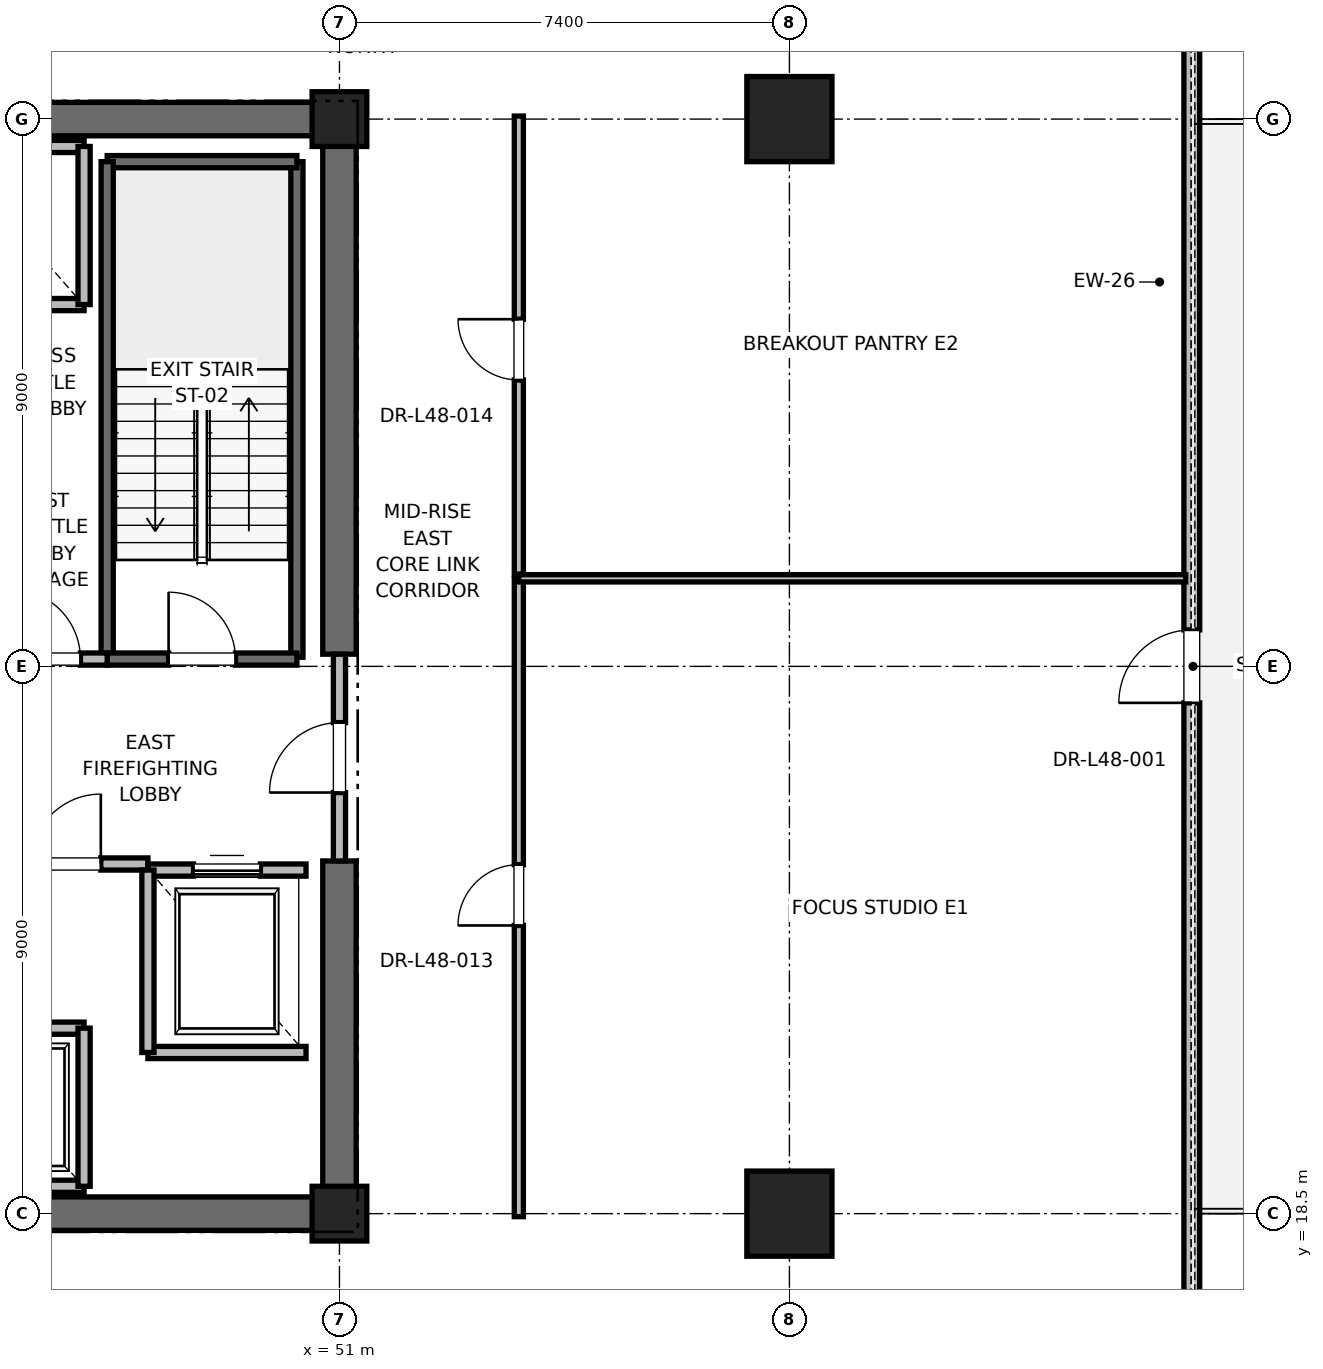
"""IFC4 building model, lengths in metres.
Left out: names, types, materials, properties, quantities, classifications, styles, units other than length and angle.
Written with IfcOpenShell. Run it as: python <this file> out.ifc"""

import sys

from ifc_helpers import new_model, si_unit, direction, frame, frame_2d, origin, origin_2d, place, context, subcontext, project, spatial, rectangle, extrude, element, fill, save


model = new_model("IFC4")
c1 = context("Model", 3, precision=1e-05, world=origin(), true_north=direction((0.0, 1.0)))
c2 = subcontext(c1, "Body", "Model", "MODEL_VIEW")
j1 = project(units=[si_unit("LENGTHUNIT", "METRE"), si_unit("PLANEANGLEUNIT", "RADIAN")], contexts=[c1])
p1 = place(None, origin())
s1 = spatial("IfcSite", under=j1, at=p1, CompositionType="ELEMENT")
p2 = place(p1, origin())
s2 = spatial("IfcBuilding", under=s1, at=p2, CompositionType="ELEMENT")
p3 = place(p2, frame((0.0, 0.0, 209.2)))
s3 = spatial("IfcBuildingStorey", under=s2, at=p3, CompositionType="ELEMENT", Elevation=209.2)
for number, where, z_axis, x_axis in (
    (1, (58.4, 18.5, 0.0), (0.0, 0.0, 1.0), (1.0, 0.0, 0.0)),
    (2, (58.4, 36.5, 0.0), (0.0, 0.0, 1.0), (1.0, 0.0, 0.0)),
):
    element("IfcColumn", number, at=place(p3, frame(where, z_axis=z_axis, x_axis=x_axis)), inside=s3, PredefinedType="COLUMN", context=c2, shape_type="SweptSolid", body=[
        extrude(rectangle(XDim=1.4, YDim=1.4, at=origin_2d()), origin(), (0.0, 0.0, 1.0), 4.0),
    ])
for number, where, z_axis, x_axis in (
    (3, (51.0, 18.5, 0.0), (0.0, 0.0, 1.0), (1.0, 0.0, 0.0)),
    (4, (51.0, 36.5, 0.0), (0.0, 0.0, 1.0), (1.0, 0.0, 0.0)),
):
    element("IfcColumn", number, at=place(p3, frame(where, z_axis=z_axis, x_axis=x_axis)), inside=s3, PredefinedType="PILASTER", context=c2, shape_type="SweptSolid", body=[
        extrude(rectangle(XDim=0.9, YDim=0.9, at=origin_2d()), origin(), (0.0, 0.0, 1.0), 4.0),
    ])
p4 = place(p3, frame((41.8, 18.5, 0.0), z_axis=(0.0, 0.0, 1.0), x_axis=(1.0, 0.0, 0.0)))
e5 = element("IfcWall", 5, at=p4, inside=s3, PredefinedType="SHEAR", context=c2, shape_type="SweptSolid", body=[
    extrude(rectangle(XDim=9.2, YDim=0.55, at=frame_2d((4.6, 0.0))), origin(), (0.0, 0.0, 1.0), 3.775),
])
for number, where, z_axis, x_axis in (
    (6, (45.2, 36.5, 0.0), (0.0, 0.0, 1.0), (1.0, 0.0, 0.0)),
    (7, (51.0, 18.5, 0.0), (0.0, 0.0, 1.0), (0.0, 1.0, 0.0)),
):
    element("IfcWall", number, at=place(p3, frame(where, z_axis=z_axis, x_axis=x_axis)), inside=s3, PredefinedType="SHEAR", context=c2, shape_type="SweptSolid", body=[
        extrude(rectangle(XDim=5.8, YDim=0.55, at=frame_2d((2.9, 0.0))), origin(), (0.0, 0.0, 1.0), 3.775),
    ])
p5 = place(p3, frame((51.0, 27.7, 0.0), z_axis=(0.0, 0.0, 1.0), x_axis=(0.0, 1.0, 0.0)))
e8 = element("IfcWall", 8, at=p5, inside=s3, PredefinedType="SHEAR", context=c2, shape_type="SweptSolid", body=[
    extrude(rectangle(XDim=8.8, YDim=0.55, at=frame_2d((4.4, 0.0))), origin(), (0.0, 0.0, 1.0), 3.775),
])
p6 = place(p3, frame((65.018, 9.258, 0.0), z_axis=(0.0, 0.0, 1.0), x_axis=(0.0, 1.0, 0.0)))
e9 = element("IfcWall", 9, at=p6, inside=s3, PredefinedType="PARAPET", context=c2, shape_type="SweptSolid", body=[
    extrude(rectangle(XDim=36.483, YDim=0.26, at=frame_2d((18.242, 0.0))), origin(), (0.0, 0.0, 1.0), 3.047),
])
p7 = place(p6, frame((4.2, 0.0, 0.85)))
e10 = element("IfcOpeningElement", 10, at=p7, cuts=e9, PredefinedType="OPENING", context=c2, shape_type="SweptSolid", body=[
    extrude(rectangle(XDim=2.0, YDim=2.3, at=frame_2d((1.0, 1.15))), frame((0.0, 0.13, 0.0), z_axis=(0.0, -1.0, 0.0), x_axis=(1.0, 0.0, 0.0)), (0.0, 0.0, 1.0), 0.26),
])
p8 = place(p6, frame((17.642, 0.0, 0.0)))
e11 = element("IfcOpeningElement", 11, at=p8, cuts=e9, PredefinedType="OPENING", context=c2, shape_type="SweptSolid", body=[
    extrude(rectangle(XDim=1.2, YDim=2.2, at=frame_2d((0.6, 1.1))), frame((0.0, 0.13, 0.0), z_axis=(0.0, -1.0, 0.0), x_axis=(1.0, 0.0, 0.0)), (0.0, 0.0, 1.0), 0.26),
])
p9 = place(p6, frame((30.283, 0.0, 0.85)))
e12 = element("IfcOpeningElement", 12, at=p9, cuts=e9, PredefinedType="OPENING", context=c2, shape_type="SweptSolid", body=[
    extrude(rectangle(XDim=2.0, YDim=2.3, at=frame_2d((1.0, 1.15))), frame((0.0, 0.13, 0.0), z_axis=(0.0, -1.0, 0.0), x_axis=(1.0, 0.0, 0.0)), (0.0, 0.0, 1.0), 0.26),
])
p10 = place(p3, frame((50.3, 27.65, 0.0), z_axis=(0.0, 0.0, 1.0), x_axis=(0.0, 1.0, 0.0)))
e13 = element("IfcWall", 13, at=p10, inside=s3, PredefinedType="SOLIDWALL", context=c2, shape_type="SweptSolid", body=[
    extrude(rectangle(XDim=8.15, YDim=0.2, at=frame_2d((4.075, 0.0))), origin(), (0.0, 0.0, 1.0), 3.775),
])
p11 = place(p3, frame((47.18, 35.8, 0.0), z_axis=(0.0, 0.0, 1.0), x_axis=(1.0, 0.0, 0.0)))
e14 = element("IfcWall", 14, at=p11, inside=s3, PredefinedType="SOLIDWALL", context=c2, shape_type="SweptSolid", body=[
    extrude(rectangle(XDim=3.12, YDim=0.2, at=frame_2d((1.56, 0.0))), origin(), (0.0, 0.0, 1.0), 3.775),
])
p12 = place(p3, frame((47.18, 27.62, 0.0), z_axis=(0.0, 0.0, 1.0), x_axis=(0.0, 1.0, 0.0)))
e15 = element("IfcWall", 15, at=p12, inside=s3, PredefinedType="SOLIDWALL", context=c2, shape_type="SweptSolid", body=[
    extrude(rectangle(XDim=8.18, YDim=0.2, at=frame_2d((4.09, 0.0))), origin(), (0.0, 0.0, 1.0), 3.775),
])
p13 = place(p3, frame((47.18, 27.62, 0.0), z_axis=(0.0, 0.0, 1.0), x_axis=(1.0, 0.0, 0.0)))
e16 = element("IfcWall", 16, at=p13, inside=s3, PredefinedType="SOLIDWALL", context=c2, shape_type="SweptSolid", body=[
    extrude(rectangle(XDim=3.12, YDim=0.2, at=frame_2d((1.56, 0.0))), origin(), (0.0, 0.0, 1.0), 3.775),
])
p14 = place(p13, frame((1.01, 0.0, 0.0)))
e17 = element("IfcOpeningElement", 17, at=p14, cuts=e16, PredefinedType="OPENING", context=c2, shape_type="SweptSolid", body=[
    extrude(rectangle(XDim=1.1, YDim=2.15, at=frame_2d((0.55, 1.075))), frame((0.0, 0.1, 0.0), z_axis=(0.0, -1.0, 0.0), x_axis=(1.0, 0.0, 0.0)), (0.0, 0.0, 1.0), 0.2),
])
p15 = place(p3, frame((45.15, 24.25, 0.0), z_axis=(0.0, 0.0, 1.0), x_axis=(1.0, 0.0, 0.0)))
e18 = element("IfcWall", 18, at=p15, inside=s3, PredefinedType="PARTITIONING", context=c2, shape_type="SweptSolid", body=[
    extrude(rectangle(XDim=2.7, YDim=0.2, at=frame_2d((1.35, 0.0))), origin(), (0.0, 0.0, 1.0), 3.775),
])
p16 = place(p15, frame((0.775, 0.0, 0.0)))
e19 = element("IfcOpeningElement", 19, at=p16, cuts=e18, PredefinedType="OPENING", context=c2, shape_type="SweptSolid", body=[
    extrude(rectangle(XDim=1.15, YDim=2.2, at=frame_2d((0.575, 1.1))), frame((0.0, 0.1, 0.0), z_axis=(0.0, -1.0, 0.0), x_axis=(1.0, 0.0, 0.0)), (0.0, 0.0, 1.0), 0.2),
])
p17 = place(p3, frame((45.15, 27.62, 0.0), z_axis=(0.0, 0.0, 1.0), x_axis=(1.0, 0.0, 0.0)))
e20 = element("IfcWall", 20, at=p17, inside=s3, PredefinedType="PARTITIONING", context=c2, shape_type="SweptSolid", body=[
    extrude(rectangle(XDim=2.03, YDim=0.2, at=frame_2d((1.015, 0.0))), origin(), (0.0, 0.0, 1.0), 3.775),
])
p18 = place(p17, frame((0.44, 0.0, 0.0)))
e21 = element("IfcOpeningElement", 21, at=p18, cuts=e20, PredefinedType="OPENING", context=c2, shape_type="SweptSolid", body=[
    extrude(rectangle(XDim=1.15, YDim=2.2, at=frame_2d((0.575, 1.1))), frame((0.0, 0.1, 0.0), z_axis=(0.0, -1.0, 0.0), x_axis=(1.0, 0.0, 0.0)), (0.0, 0.0, 1.0), 0.2),
])
p19 = place(p3, frame((51.0, 24.3, 0.0), z_axis=(0.0, 0.0, 1.0), x_axis=(0.0, 1.0, 0.0)))
e22 = element("IfcWall", 22, at=p19, inside=s3, PredefinedType="PARTITIONING", context=c2, shape_type="SweptSolid", body=[
    extrude(rectangle(XDim=3.4, YDim=0.2, at=frame_2d((1.7, 0.0))), origin(), (0.0, 0.0, 1.0), 2.755),
])
p20 = place(p19, frame((1.125, 0.0, 0.0)))
e23 = element("IfcOpeningElement", 23, at=p20, cuts=e22, PredefinedType="OPENING", context=c2, shape_type="SweptSolid", body=[
    extrude(rectangle(XDim=1.15, YDim=2.2, at=frame_2d((0.575, 1.1))), frame((0.0, 0.1, 0.0), z_axis=(0.0, -1.0, 0.0), x_axis=(1.0, 0.0, 0.0)), (0.0, 0.0, 1.0), 0.2),
])
p21 = place(p3, frame((47.85, 21.15, 0.0), z_axis=(0.0, 0.0, 1.0), x_axis=(1.0, 0.0, 0.0)))
e24 = element("IfcWall", 24, at=p21, inside=s3, PredefinedType="SOLIDWALL", context=c2, shape_type="SweptSolid", body=[
    extrude(rectangle(XDim=2.6, YDim=0.2, at=frame_2d((1.3, 0.0))), origin(), (0.0, 0.0, 1.0), 3.775),
])
p22 = place(p3, frame((50.45, 24.15, 0.0), z_axis=(0.0, 0.0, 1.0), x_axis=(-1.0, 0.0, 0.0)))
e25 = element("IfcWall", 25, at=p22, inside=s3, PredefinedType="SOLIDWALL", context=c2, shape_type="SweptSolid", body=[
    extrude(rectangle(XDim=2.6, YDim=0.2, at=frame_2d((1.3, 0.0))), origin(), (0.0, 0.0, 1.0), 2.755),
])
p23 = place(p22, frame((0.75, 0.0, 0.0)))
e26 = element("IfcOpeningElement", 26, at=p23, cuts=e25, PredefinedType="OPENING", context=c2, shape_type="SweptSolid", body=[
    extrude(rectangle(XDim=1.1, YDim=2.2, at=frame_2d((0.55, 1.1))), frame((0.0, 0.1, 0.0), z_axis=(0.0, -1.0, 0.0), x_axis=(1.0, 0.0, 0.0)), (0.0, 0.0, 1.0), 0.2),
])
p24 = place(p3, frame((47.85, 24.15, 0.0), z_axis=(0.0, 0.0, 1.0), x_axis=(0.0, -1.0, 0.0)))
e27 = element("IfcWall", 27, at=p24, inside=s3, PredefinedType="SOLIDWALL", context=c2, shape_type="SweptSolid", body=[
    extrude(rectangle(XDim=3.0, YDim=0.2, at=frame_2d((1.5, 0.0))), origin(), (0.0, 0.0, 1.0), 3.775),
])
p25 = place(p3, frame((44.5, 18.95, 0.0), z_axis=(0.0, 0.0, 1.0), x_axis=(1.0, 0.0, 0.0)))
e28 = element("IfcWall", 28, at=p25, inside=s3, PredefinedType="SOLIDWALL", context=c2, shape_type="SweptSolid", body=[
    extrude(rectangle(XDim=2.3, YDim=0.2, at=frame_2d((1.15, 0.0))), origin(), (0.0, 0.0, 1.0), 3.775),
])
p26 = place(p3, frame((46.8, 21.55, 0.0), z_axis=(0.0, 0.0, 1.0), x_axis=(-1.0, 0.0, 0.0)))
e29 = element("IfcWall", 29, at=p26, inside=s3, PredefinedType="SOLIDWALL", context=c2, shape_type="SweptSolid", body=[
    extrude(rectangle(XDim=2.3, YDim=0.2, at=frame_2d((1.15, 0.0))), origin(), (0.0, 0.0, 1.0), 3.775),
])
p27 = place(p26, frame((0.6, 0.0, 0.0)))
e30 = element("IfcOpeningElement", 30, at=p27, cuts=e29, PredefinedType="OPENING", context=c2, shape_type="SweptSolid", body=[
    extrude(rectangle(XDim=1.1, YDim=2.2, at=frame_2d((0.55, 1.1))), frame((0.0, 0.1, 0.0), z_axis=(0.0, -1.0, 0.0), x_axis=(1.0, 0.0, 0.0)), (0.0, 0.0, 1.0), 0.2),
])
p28 = place(p3, frame((46.8, 18.95, 0.0), z_axis=(0.0, 0.0, 1.0), x_axis=(0.0, 1.0, 0.0)))
e31 = element("IfcWall", 31, at=p28, inside=s3, PredefinedType="SOLIDWALL", context=c2, shape_type="SweptSolid", body=[
    extrude(rectangle(XDim=2.6, YDim=0.2, at=frame_2d((1.3, 0.0))), origin(), (0.0, 0.0, 1.0), 3.775),
])
p29 = place(p3, frame((44.5, 33.45, 0.0), z_axis=(0.0, 0.0, 1.0), x_axis=(1.0, 0.0, 0.0)))
e32 = element("IfcWall", 32, at=p29, inside=s3, PredefinedType="SOLIDWALL", context=c2, shape_type="SweptSolid", body=[
    extrude(rectangle(XDim=2.3, YDim=0.2, at=frame_2d((1.15, 0.0))), origin(), (0.0, 0.0, 1.0), 3.775),
])
p30 = place(p3, frame((46.8, 36.05, 0.0), z_axis=(0.0, 0.0, 1.0), x_axis=(-1.0, 0.0, 0.0)))
e33 = element("IfcWall", 33, at=p30, inside=s3, PredefinedType="SOLIDWALL", context=c2, shape_type="SweptSolid", body=[
    extrude(rectangle(XDim=2.3, YDim=0.2, at=frame_2d((1.15, 0.0))), origin(), (0.0, 0.0, 1.0), 2.755),
])
p31 = place(p3, frame((46.8, 33.45, 0.0), z_axis=(0.0, 0.0, 1.0), x_axis=(0.0, 1.0, 0.0)))
e34 = element("IfcWall", 34, at=p31, inside=s3, PredefinedType="SOLIDWALL", context=c2, shape_type="SweptSolid", body=[
    extrude(rectangle(XDim=2.6, YDim=0.2, at=frame_2d((1.3, 0.0))), origin(), (0.0, 0.0, 1.0), 3.775),
])
p32 = place(p3, frame((53.95, 18.45, 0.0), z_axis=(0.0, 0.0, 1.0), x_axis=(0.0, 1.0, 0.0)))
e35 = element("IfcWall", 35, at=p32, inside=s3, PredefinedType="PARTITIONING", context=c2, shape_type="SweptSolid", body=[
    extrude(rectangle(XDim=10.498, YDim=0.15, at=frame_2d((5.249, 0.0))), origin(), (0.0, 0.0, 1.0), 2.85),
])
p33 = place(p32, frame((4.789, 0.0, 0.0)))
e36 = element("IfcOpeningElement", 36, at=p33, cuts=e35, PredefinedType="OPENING", context=c2, shape_type="SweptSolid", body=[
    extrude(rectangle(XDim=1.0, YDim=2.15, at=frame_2d((0.5, 1.075))), frame((0.0, 0.075, 0.0), z_axis=(0.0, -1.0, 0.0), x_axis=(1.0, 0.0, 0.0)), (0.0, 0.0, 1.0), 0.15),
])
p34 = place(p3, frame((53.95, 28.948, 0.0), z_axis=(0.0, 0.0, 1.0), x_axis=(1.0, 0.0, 0.0)))
e37 = element("IfcWall", 37, at=p34, inside=s3, PredefinedType="PARTITIONING", context=c2, shape_type="SweptSolid", body=[
    extrude(rectangle(XDim=10.968, YDim=0.12, at=frame_2d((5.484, 0.0))), origin(), (0.0, 0.0, 1.0), 2.85),
])
p35 = place(p3, frame((53.95, 29.018, 0.0), z_axis=(0.0, 0.0, 1.0), x_axis=(0.0, 1.0, 0.0)))
e38 = element("IfcWall", 38, at=p35, inside=s3, PredefinedType="PARTITIONING", context=c2, shape_type="SweptSolid", body=[
    extrude(rectangle(XDim=7.532, YDim=0.15, at=frame_2d((3.766, 0.0))), origin(), (0.0, 0.0, 1.0), 2.85),
])
p36 = place(p35, frame((3.191, 0.0, 0.0)))
e39 = element("IfcOpeningElement", 39, at=p36, cuts=e38, PredefinedType="OPENING", context=c2, shape_type="SweptSolid", body=[
    extrude(rectangle(XDim=1.0, YDim=2.15, at=frame_2d((0.5, 1.075))), frame((0.0, 0.075, 0.0), z_axis=(0.0, -1.0, 0.0), x_axis=(1.0, 0.0, 0.0)), (0.0, 0.0, 1.0), 0.15),
])
p37 = place(p8, origin())
e40 = element("IfcDoor", 40, at=p37, inside=s3, OperationType="SINGLE_SWING_LEFT", PredefinedType="DOOR", context=c2, shape_type="SweptSolid", body=[
    extrude(rectangle(XDim=1.2, YDim=2.2, at=frame_2d((0.6, 1.1))), frame((0.0, 0.025, 0.0), z_axis=(0.0, -1.0, 0.0), x_axis=(1.0, 0.0, 0.0)), (0.0, 0.0, 1.0), 0.05),
])
fill(e11, e40)
p38 = place(p14, origin())
e41 = element("IfcDoor", 41, at=p38, inside=s3, OperationType="SINGLE_SWING_LEFT", PredefinedType="DOOR", context=c2, shape_type="SweptSolid", body=[
    extrude(rectangle(XDim=1.1, YDim=2.15, at=frame_2d((0.55, 1.075))), frame((0.0, 0.025, 0.0), z_axis=(0.0, -1.0, 0.0), x_axis=(1.0, 0.0, 0.0)), (0.0, 0.0, 1.0), 0.05),
])
fill(e17, e41)
p39 = place(p16, origin())
e42 = element("IfcDoor", 42, at=p39, inside=s3, OperationType="SINGLE_SWING_RIGHT", PredefinedType="DOOR", context=c2, shape_type="SweptSolid", body=[
    extrude(rectangle(XDim=1.15, YDim=2.2, at=frame_2d((0.575, 1.1))), frame((0.0, 0.025, 0.0), z_axis=(0.0, -1.0, 0.0), x_axis=(1.0, 0.0, 0.0)), (0.0, 0.0, 1.0), 0.05),
])
fill(e19, e42)
p40 = place(p18, origin())
e43 = element("IfcDoor", 43, at=p40, inside=s3, OperationType="SINGLE_SWING_LEFT", PredefinedType="DOOR", context=c2, shape_type="SweptSolid", body=[
    extrude(rectangle(XDim=1.15, YDim=2.2, at=frame_2d((0.575, 1.1))), frame((0.0, 0.025, 0.0), z_axis=(0.0, -1.0, 0.0), x_axis=(1.0, 0.0, 0.0)), (0.0, 0.0, 1.0), 0.05),
])
fill(e21, e43)
p41 = place(p20, origin())
e44 = element("IfcDoor", 44, at=p41, inside=s3, OperationType="SINGLE_SWING_LEFT", PredefinedType="DOOR", context=c2, shape_type="SweptSolid", body=[
    extrude(rectangle(XDim=1.15, YDim=2.2, at=frame_2d((0.575, 1.1))), frame((0.0, 0.025, 0.0), z_axis=(0.0, -1.0, 0.0), x_axis=(1.0, 0.0, 0.0)), (0.0, 0.0, 1.0), 0.05),
])
fill(e23, e44)
p42 = place(p23, origin())
e45 = element("IfcDoor", 45, at=p42, inside=s3, OperationType="SLIDING_TO_RIGHT", PredefinedType="DOOR", context=c2, shape_type="SweptSolid", body=[
    extrude(rectangle(XDim=1.1, YDim=2.2, at=frame_2d((0.55, 1.1))), frame((0.0, 0.025, 0.0), z_axis=(0.0, -1.0, 0.0), x_axis=(1.0, 0.0, 0.0)), (0.0, 0.0, 1.0), 0.05),
])
fill(e26, e45)
p43 = place(p33, origin())
e46 = element("IfcDoor", 46, at=p43, inside=s3, OperationType="SINGLE_SWING_LEFT", PredefinedType="DOOR", context=c2, shape_type="SweptSolid", body=[
    extrude(rectangle(XDim=1.0, YDim=2.15, at=frame_2d((0.5, 1.075))), frame((0.0, 0.025, 0.0), z_axis=(0.0, -1.0, 0.0), x_axis=(1.0, 0.0, 0.0)), (0.0, 0.0, 1.0), 0.05),
])
fill(e36, e46)
p44 = place(p36, origin())
e47 = element("IfcDoor", 47, at=p44, inside=s3, OperationType="SINGLE_SWING_RIGHT", PredefinedType="DOOR", context=c2, shape_type="SweptSolid", body=[
    extrude(rectangle(XDim=1.0, YDim=2.15, at=frame_2d((0.5, 1.075))), frame((0.0, 0.025, 0.0), z_axis=(0.0, -1.0, 0.0), x_axis=(1.0, 0.0, 0.0)), (0.0, 0.0, 1.0), 0.05),
])
fill(e39, e47)
save(model, sys.argv[1])
